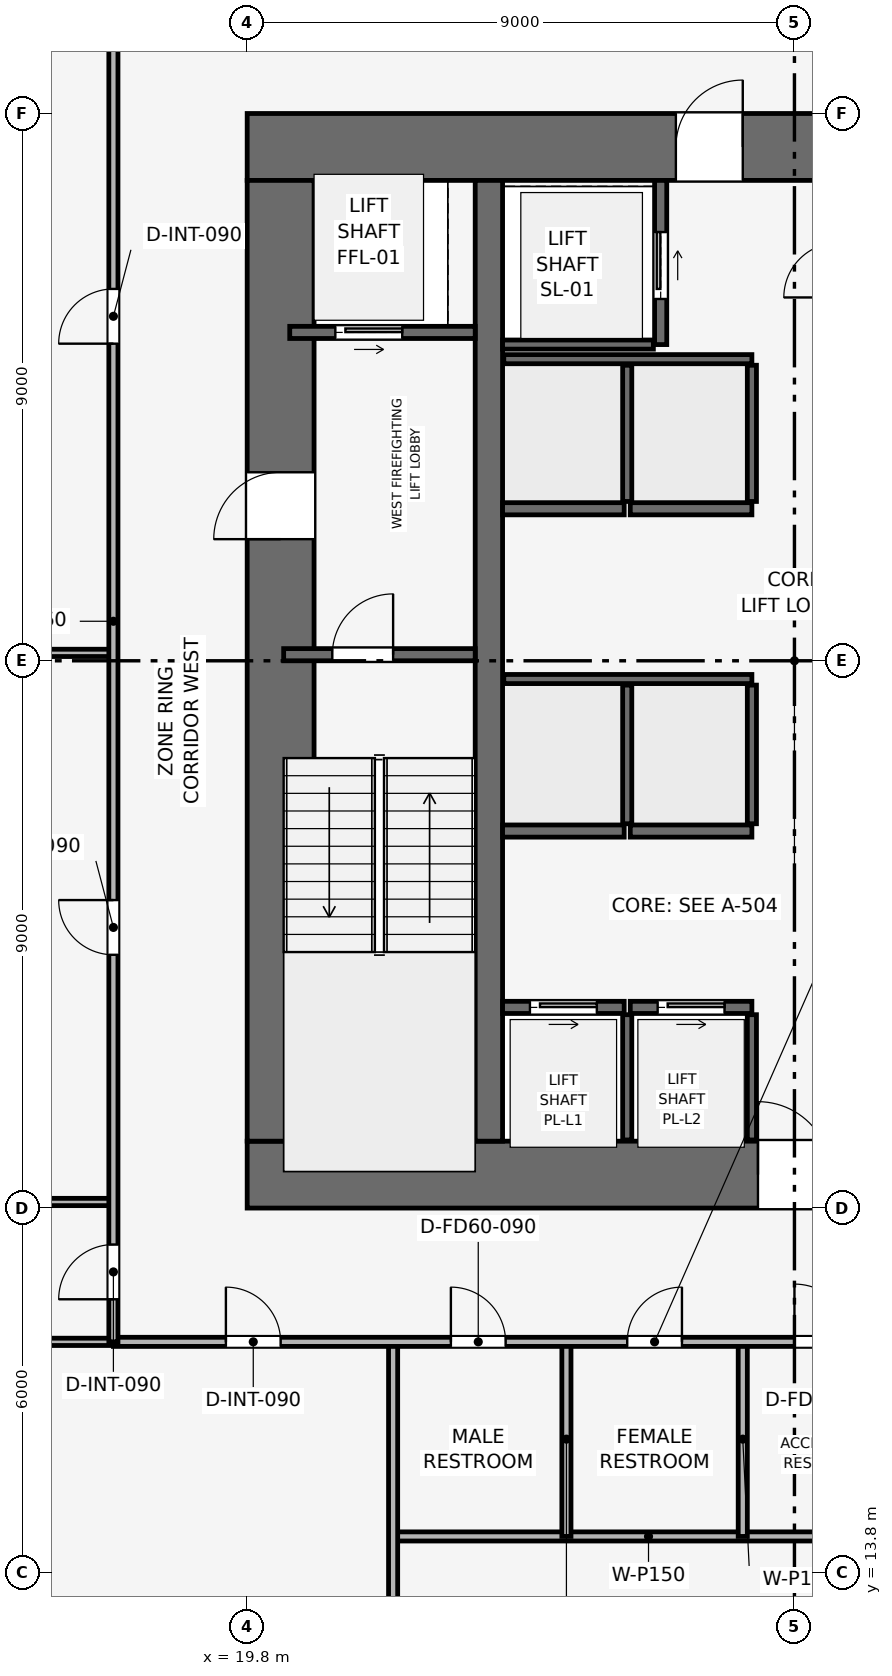
"""IFC4 building model, lengths in metres.
Left out: names, types, materials, properties, quantities, classifications, styles, units other than length and angle.
Written with IfcOpenShell. Run it as: python <this file> out.ifc"""

import sys

from ifc_helpers import new_model, si_unit, direction, frame, frame_2d, origin, place, context, subcontext, project, spatial, rectangle, extrude, element, fill, save


model = new_model("IFC4")
c1 = context("Model", 3, precision=1e-05, world=origin(), true_north=direction((0.0, 1.0)))
c2 = subcontext(c1, "Body", "Model", "MODEL_VIEW")
j1 = project(units=[si_unit("LENGTHUNIT", "METRE"), si_unit("PLANEANGLEUNIT", "RADIAN")], contexts=[c1])
p1 = place(None, origin())
s1 = spatial("IfcSite", under=j1, at=p1, CompositionType="ELEMENT")
p2 = place(p1, origin())
s2 = spatial("IfcBuilding", under=s1, at=p2, CompositionType="ELEMENT")
p3 = place(p2, frame((0.0, 0.0, 37.8)))
s3 = spatial("IfcBuildingStorey", under=s2, at=p3, CompositionType="ELEMENT", Elevation=37.8)
p4 = place(p3, frame((19.8, 20.35, 0.0), z_axis=(0.0, 0.0, 1.0), x_axis=(1.0, 0.0, 0.0)))
e1 = element("IfcWall", 1, at=p4, inside=s3, PredefinedType="SHEAR", context=c2, shape_type="SweptSolid", body=[
    extrude(rectangle(XDim=18.0, YDim=1.1, at=frame_2d((9.0, 0.0))), origin(), (0.0, 0.0, 1.0), 3.9),
])
p5 = place(p4, frame((8.4, 0.0, 0.0)))
e2 = element("IfcOpeningElement", 2, at=p5, cuts=e1, PredefinedType="OPENING", context=c2, shape_type="SweptSolid", body=[
    extrude(rectangle(XDim=1.2, YDim=2.2, at=frame_2d((0.6, 1.1))), frame((0.0, 0.56, 0.0), z_axis=(0.0, -1.0, 0.0), x_axis=(1.0, 0.0, 0.0)), (0.0, 0.0, 1.0), 1.12),
])
p6 = place(p3, frame((19.8, 37.25, 0.0), z_axis=(0.0, 0.0, 1.0), x_axis=(1.0, 0.0, 0.0)))
e3 = element("IfcWall", 3, at=p6, inside=s3, PredefinedType="SHEAR", context=c2, shape_type="SweptSolid", body=[
    extrude(rectangle(XDim=18.0, YDim=1.1, at=frame_2d((9.0, 0.0))), origin(), (0.0, 0.0, 1.0), 3.9),
])
p7 = place(p6, frame((7.05, 0.0, 0.0)))
e4 = element("IfcOpeningElement", 4, at=p7, cuts=e3, PredefinedType="OPENING", context=c2, shape_type="SweptSolid", body=[
    extrude(rectangle(XDim=1.1, YDim=2.15, at=frame_2d((0.55, 1.075))), frame((0.0, 0.56, 0.0), z_axis=(0.0, -1.0, 0.0), x_axis=(1.0, 0.0, 0.0)), (0.0, 0.0, 1.0), 1.12),
])
p8 = place(p3, frame((20.35, 20.9, 0.0), z_axis=(0.0, 0.0, 1.0), x_axis=(0.0, 1.0, 0.0)))
e5 = element("IfcWall", 5, at=p8, inside=s3, PredefinedType="SHEAR", context=c2, shape_type="SweptSolid", body=[
    extrude(rectangle(XDim=15.8, YDim=1.1, at=frame_2d((7.9, 0.0))), origin(), (0.0, 0.0, 1.0), 3.9),
])
p9 = place(p8, frame((9.9, 0.0, 0.0)))
e6 = element("IfcOpeningElement", 6, at=p9, cuts=e5, PredefinedType="OPENING", context=c2, shape_type="SweptSolid", body=[
    extrude(rectangle(XDim=1.1, YDim=2.15, at=frame_2d((0.55, 1.075))), frame((0.0, 0.56, 0.0), z_axis=(0.0, -1.0, 0.0), x_axis=(1.0, 0.0, 0.0)), (0.0, 0.0, 1.0), 1.12),
])
p10 = place(p3, frame((23.775, 20.9, 0.0), z_axis=(0.0, 0.0, 1.0), x_axis=(0.0, 1.0, 0.0)))
e7 = element("IfcWall", 7, at=p10, inside=s3, PredefinedType="SHEAR", context=c2, shape_type="SweptSolid", body=[
    extrude(rectangle(XDim=15.8, YDim=0.45, at=frame_2d((7.9, 0.0))), origin(), (0.0, 0.0, 1.0), 3.9),
])
p11 = place(p3, frame((20.4, 28.9, 0.0), z_axis=(0.0, 0.0, 1.0), x_axis=(1.0, 0.0, 0.0)))
e8 = element("IfcWall", 8, at=p11, inside=s3, PredefinedType="SHEAR", context=c2, shape_type="SweptSolid", body=[
    extrude(rectangle(XDim=3.15, YDim=0.2, at=frame_2d((1.575, 0.0))), origin(), (0.0, 0.0, 1.0), 3.65),
])
p12 = place(p11, frame((0.8, 0.0, 0.0)))
e9 = element("IfcOpeningElement", 9, at=p12, cuts=e8, PredefinedType="OPENING", context=c2, shape_type="SweptSolid", body=[
    extrude(rectangle(XDim=1.0, YDim=2.1, at=frame_2d((0.5, 1.05))), frame((0.0, 0.11, 0.0), z_axis=(0.0, -1.0, 0.0), x_axis=(1.0, 0.0, 0.0)), (0.0, 0.0, 1.0), 0.22),
])
p13 = place(p3, frame((20.5, 34.2, 0.0), z_axis=(0.0, 0.0, 1.0), x_axis=(1.0, 0.0, 0.0)))
e10 = element("IfcWall", 10, at=p13, inside=s3, PredefinedType="SHEAR", context=c2, shape_type="SweptSolid", body=[
    extrude(rectangle(XDim=3.05, YDim=0.2, at=frame_2d((1.525, 0.0))), origin(), (0.0, 0.0, 1.0), 3.65),
])
p14 = place(p13, frame((0.75, 0.0, 0.0)))
e11 = element("IfcOpeningElement", 11, at=p14, cuts=e10, PredefinedType="OPENING", context=c2, shape_type="SweptSolid", body=[
    extrude(rectangle(XDim=1.1, YDim=2.15, at=frame_2d((0.55, 1.075))), frame((0.0, 0.11, 0.0), z_axis=(0.0, -1.0, 0.0), x_axis=(1.0, 0.0, 0.0)), (0.0, 0.0, 1.0), 0.22),
])
p15 = place(p3, frame((26.6, 34.0, 0.0), z_axis=(0.0, 0.0, 1.0), x_axis=(0.0, 1.0, 0.0)))
e12 = element("IfcWall", 12, at=p15, inside=s3, PredefinedType="SHEAR", context=c2, shape_type="SweptSolid", body=[
    extrude(rectangle(XDim=2.7, YDim=0.2, at=frame_2d((1.35, 0.0))), origin(), (0.0, 0.0, 1.0), 3.65),
])
p16 = place(p15, frame((0.75, 0.0, 0.0)))
e13 = element("IfcOpeningElement", 13, at=p16, cuts=e12, PredefinedType="OPENING", context=c2, shape_type="SweptSolid", body=[
    extrude(rectangle(XDim=1.1, YDim=2.15, at=frame_2d((0.55, 1.075))), frame((0.0, 0.11, 0.0), z_axis=(0.0, -1.0, 0.0), x_axis=(1.0, 0.0, 0.0)), (0.0, 0.0, 1.0), 0.22),
])
p17 = place(p3, frame((24.0, 34.0, 0.0), z_axis=(0.0, 0.0, 1.0), x_axis=(1.0, 0.0, 0.0)))
e14 = element("IfcWall", 14, at=p17, inside=s3, PredefinedType="SHEAR", context=c2, shape_type="SweptSolid", body=[
    extrude(rectangle(XDim=2.48, YDim=0.15, at=frame_2d((1.24, 0.0))), origin(), (0.0, 0.0, 1.0), 3.65),
])
p18 = place(p3, frame((24.0, 23.1, 0.0), z_axis=(0.0, 0.0, 1.0), x_axis=(1.0, 0.0, 0.0)))
e15 = element("IfcWall", 15, at=p18, inside=s3, PredefinedType="SHEAR", context=c2, shape_type="SweptSolid", body=[
    extrude(rectangle(XDim=2.0, YDim=0.2, at=frame_2d((1.0, 0.0))), origin(), (0.0, 0.0, 1.0), 3.65),
])
p19 = place(p18, frame((0.45, 0.0, 0.0)))
e16 = element("IfcOpeningElement", 16, at=p19, cuts=e15, PredefinedType="OPENING", context=c2, shape_type="SweptSolid", body=[
    extrude(rectangle(XDim=1.1, YDim=2.15, at=frame_2d((0.55, 1.075))), frame((0.0, 0.11, 0.0), z_axis=(0.0, -1.0, 0.0), x_axis=(1.0, 0.0, 0.0)), (0.0, 0.0, 1.0), 0.22),
])
p20 = place(p3, frame((26.1, 23.1, 0.0), z_axis=(0.0, 0.0, 1.0), x_axis=(1.0, 0.0, 0.0)))
e17 = element("IfcWall", 17, at=p20, inside=s3, PredefinedType="SHEAR", context=c2, shape_type="SweptSolid", body=[
    extrude(rectangle(XDim=2.0, YDim=0.2, at=frame_2d((1.0, 0.0))), origin(), (0.0, 0.0, 1.0), 3.65),
])
p21 = place(p20, frame((0.45, 0.0, 0.0)))
e18 = element("IfcOpeningElement", 18, at=p21, cuts=e17, PredefinedType="OPENING", context=c2, shape_type="SweptSolid", body=[
    extrude(rectangle(XDim=1.1, YDim=2.15, at=frame_2d((0.55, 1.075))), frame((0.0, 0.11, 0.0), z_axis=(0.0, -1.0, 0.0), x_axis=(1.0, 0.0, 0.0)), (0.0, 0.0, 1.0), 0.22),
])
for number, where, z_axis, x_axis in (
    (19, (24.0, 26.0, 0.0), (0.0, 0.0, 1.0), (1.0, 0.0, 0.0)),
    (20, (26.1, 26.0, 0.0), (0.0, 0.0, 1.0), (1.0, 0.0, 0.0)),
    (21, (24.0, 31.3, 0.0), (0.0, 0.0, 1.0), (1.0, 0.0, 0.0)),
    (22, (26.1, 31.3, 0.0), (0.0, 0.0, 1.0), (1.0, 0.0, 0.0)),
):
    element("IfcWall", number, at=place(p3, frame(where, z_axis=z_axis, x_axis=x_axis)), inside=s3, PredefinedType="SHEAR", context=c2, shape_type="SweptSolid", body=[
        extrude(rectangle(XDim=2.0, YDim=0.2, at=frame_2d((1.0, 0.0))), origin(), (0.0, 0.0, 1.0), 3.65),
    ])
for number, where, z_axis, x_axis in (
    (23, (26.05, 20.92, 0.0), (0.0, 0.0, 1.0), (0.0, 1.0, 0.0)),
    (24, (28.1, 20.92, 0.0), (0.0, 0.0, 1.0), (0.0, 1.0, 0.0)),
):
    element("IfcWall", number, at=place(p3, frame(where, z_axis=z_axis, x_axis=x_axis)), inside=s3, PredefinedType="SHEAR", context=c2, shape_type="SweptSolid", body=[
        extrude(rectangle(XDim=2.06, YDim=0.15, at=frame_2d((1.03, 0.0))), origin(), (0.0, 0.0, 1.0), 3.65),
    ])
p22 = place(p3, frame((24.02, 28.5, 0.0), z_axis=(0.0, 0.0, 1.0), x_axis=(1.0, 0.0, 0.0)))
e25 = element("IfcWall", 25, at=p22, inside=s3, PredefinedType="SHEAR", context=c2, shape_type="SweptSolid", body=[
    extrude(rectangle(XDim=4.08, YDim=0.15, at=frame_2d((2.04, 0.0))), origin(), (0.0, 0.0, 1.0), 3.65),
])
for number, where, z_axis, x_axis in (
    (26, (26.05, 26.12, 0.0), (0.0, 0.0, 1.0), (0.0, 1.0, 0.0)),
    (27, (28.1, 26.12, 0.0), (0.0, 0.0, 1.0), (0.0, 1.0, 0.0)),
):
    element("IfcWall", number, at=place(p3, frame(where, z_axis=z_axis, x_axis=x_axis)), inside=s3, PredefinedType="SHEAR", context=c2, shape_type="SweptSolid", body=[
        extrude(rectangle(XDim=2.28, YDim=0.15, at=frame_2d((1.14, 0.0))), origin(), (0.0, 0.0, 1.0), 3.65),
    ])
p23 = place(p3, frame((24.02, 33.76, 0.0), z_axis=(0.0, 0.0, 1.0), x_axis=(1.0, 0.0, 0.0)))
e28 = element("IfcWall", 28, at=p23, inside=s3, PredefinedType="SHEAR", context=c2, shape_type="SweptSolid", body=[
    extrude(rectangle(XDim=4.08, YDim=0.15, at=frame_2d((2.04, 0.0))), origin(), (0.0, 0.0, 1.0), 3.65),
])
for number, where, z_axis, x_axis in (
    (29, (26.05, 31.42, 0.0), (0.0, 0.0, 1.0), (0.0, 1.0, 0.0)),
    (30, (28.1, 31.42, 0.0), (0.0, 0.0, 1.0), (0.0, 1.0, 0.0)),
):
    element("IfcWall", number, at=place(p3, frame(where, z_axis=z_axis, x_axis=x_axis)), inside=s3, PredefinedType="SHEAR", context=c2, shape_type="SweptSolid", body=[
        extrude(rectangle(XDim=2.24, YDim=0.15, at=frame_2d((1.12, 0.0))), origin(), (0.0, 0.0, 1.0), 3.65),
    ])
p24 = place(p3, frame((22.2, 14.4, 0.0), z_axis=(0.0, 0.0, 1.0), x_axis=(1.0, 0.0, 0.0)))
e31 = element("IfcWall", 31, at=p24, inside=s3, PredefinedType="PARTITIONING", context=c2, shape_type="SweptSolid", body=[
    extrude(rectangle(XDim=8.4, YDim=0.15, at=frame_2d((4.2, 0.0))), origin(), (0.0, 0.0, 1.0), 3.085),
])
p25 = place(p3, frame((22.2, 1.03, 0.0), z_axis=(0.0, 0.0, 1.0), x_axis=(0.0, 1.0, 0.0)))
e32 = element("IfcWall", 32, at=p25, inside=s3, PredefinedType="PARTITIONING", context=c2, shape_type="SweptSolid", body=[
    extrude(rectangle(XDim=16.57, YDim=0.15, at=frame_2d((8.285, 0.0))), origin(), (0.0, 0.0, 1.0), 2.935),
])
p26 = place(p25, frame((6.235, 0.0, 0.0)))
e33 = element("IfcOpeningElement", 33, at=p26, cuts=e32, PredefinedType="OPENING", context=c2, shape_type="SweptSolid", body=[
    extrude(rectangle(XDim=0.9, YDim=2.1, at=frame_2d((0.45, 1.05))), frame((0.0, 0.085, 0.0), z_axis=(0.0, -1.0, 0.0), x_axis=(1.0, 0.0, 0.0)), (0.0, 0.0, 1.0), 0.17),
])
for number, where, z_axis, x_axis in (
    (34, (25.05, 14.4, 0.0), (0.0, 0.0, 1.0), (0.0, 1.0, 0.0)),
    (35, (27.95, 14.4, 0.0), (0.0, 0.0, 1.0), (0.0, 1.0, 0.0)),
):
    element("IfcWall", number, at=place(p3, frame(where, z_axis=z_axis, x_axis=x_axis)), inside=s3, PredefinedType="PARTITIONING", context=c2, shape_type="SweptSolid", body=[
        extrude(rectangle(XDim=3.2, YDim=0.15, at=frame_2d((1.6, 0.0))), origin(), (0.0, 0.0, 1.0), 3.65),
    ])
for number, where, z_axis, x_axis in (
    (36, (1.03, 17.6, 0.0), (0.0, 0.0, 1.0), (1.0, 0.0, 0.0)),
    (37, (1.03, 19.9, 0.0), (0.0, 0.0, 1.0), (1.0, 0.0, 0.0)),
):
    element("IfcWall", number, at=place(p3, frame(where, z_axis=z_axis, x_axis=x_axis)), inside=s3, PredefinedType="PARTITIONING", context=c2, shape_type="SweptSolid", body=[
        extrude(rectangle(XDim=16.57, YDim=0.12, at=frame_2d((8.285, 0.0))), origin(), (0.0, 0.0, 1.0), 2.935),
    ])
p27 = place(p3, frame((1.03, 28.93, 0.0), z_axis=(0.0, 0.0, 1.0), x_axis=(1.0, 0.0, 0.0)))
e38 = element("IfcWall", 38, at=p27, inside=s3, PredefinedType="PARTITIONING", context=c2, shape_type="SweptSolid", body=[
    extrude(rectangle(XDim=16.57, YDim=0.12, at=frame_2d((8.285, 0.0))), origin(), (0.0, 0.0, 1.0), 3.085),
])
p28 = place(p3, frame((17.6, 17.6, 0.0), z_axis=(0.0, 0.0, 1.0), x_axis=(1.0, 0.0, 0.0)))
e39 = element("IfcWall", 39, at=p28, inside=s3, PredefinedType="PARTITIONING", context=c2, shape_type="SweptSolid", body=[
    extrude(rectangle(XDim=22.4, YDim=0.15, at=frame_2d((11.2, 0.0))), origin(), (0.0, 0.0, 1.0), 3.085),
])
p29 = place(p28, frame((1.85, 0.0, 0.0)))
e40 = element("IfcOpeningElement", 40, at=p29, cuts=e39, PredefinedType="OPENING", context=c2, shape_type="SweptSolid", body=[
    extrude(rectangle(XDim=0.9, YDim=2.1, at=frame_2d((0.45, 1.05))), frame((0.0, 0.085, 0.0), z_axis=(0.0, -1.0, 0.0), x_axis=(1.0, 0.0, 0.0)), (0.0, 0.0, 1.0), 0.17),
])
p30 = place(p28, frame((5.55, 0.0, 0.0)))
e41 = element("IfcOpeningElement", 41, at=p30, cuts=e39, PredefinedType="OPENING", context=c2, shape_type="SweptSolid", body=[
    extrude(rectangle(XDim=0.9, YDim=2.1, at=frame_2d((0.45, 1.05))), frame((0.0, 0.085, 0.0), z_axis=(0.0, -1.0, 0.0), x_axis=(1.0, 0.0, 0.0)), (0.0, 0.0, 1.0), 0.17),
])
p31 = place(p28, frame((8.45, 0.0, 0.0)))
e42 = element("IfcOpeningElement", 42, at=p31, cuts=e39, PredefinedType="OPENING", context=c2, shape_type="SweptSolid", body=[
    extrude(rectangle(XDim=0.9, YDim=2.1, at=frame_2d((0.45, 1.05))), frame((0.0, 0.085, 0.0), z_axis=(0.0, -1.0, 0.0), x_axis=(1.0, 0.0, 0.0)), (0.0, 0.0, 1.0), 0.17),
])
p32 = place(p28, frame((11.2, 0.0, 0.0)))
e43 = element("IfcOpeningElement", 43, at=p32, cuts=e39, PredefinedType="OPENING", context=c2, shape_type="SweptSolid", body=[
    extrude(rectangle(XDim=0.95, YDim=2.1, at=frame_2d((0.475, 1.05))), frame((0.0, 0.085, 0.0), z_axis=(0.0, -1.0, 0.0), x_axis=(1.0, 0.0, 0.0)), (0.0, 0.0, 1.0), 0.17),
])
p33 = place(p28, frame((17.25, 0.0, 0.0)))
e44 = element("IfcOpeningElement", 44, at=p33, cuts=e39, PredefinedType="OPENING", context=c2, shape_type="SweptSolid", body=[
    extrude(rectangle(XDim=0.9, YDim=2.1, at=frame_2d((0.45, 1.05))), frame((0.0, 0.085, 0.0), z_axis=(0.0, -1.0, 0.0), x_axis=(1.0, 0.0, 0.0)), (0.0, 0.0, 1.0), 0.17),
])
p34 = place(p3, frame((17.6, 17.6, 0.0), z_axis=(0.0, 0.0, 1.0), x_axis=(0.0, 1.0, 0.0)))
e45 = element("IfcWall", 45, at=p34, inside=s3, PredefinedType="PARTITIONING", context=c2, shape_type="SweptSolid", body=[
    extrude(rectangle(XDim=22.4, YDim=0.15, at=frame_2d((11.2, 0.0))), origin(), (0.0, 0.0, 1.0), 3.085),
])
p35 = place(p34, frame((0.7, 0.0, 0.0)))
e46 = element("IfcOpeningElement", 46, at=p35, cuts=e45, PredefinedType="OPENING", context=c2, shape_type="SweptSolid", body=[
    extrude(rectangle(XDim=0.9, YDim=2.1, at=frame_2d((0.45, 1.05))), frame((0.0, 0.085, 0.0), z_axis=(0.0, -1.0, 0.0), x_axis=(1.0, 0.0, 0.0)), (0.0, 0.0, 1.0), 0.17),
])
p36 = place(p34, frame((6.365, 0.0, 0.0)))
e47 = element("IfcOpeningElement", 47, at=p36, cuts=e45, PredefinedType="OPENING", context=c2, shape_type="SweptSolid", body=[
    extrude(rectangle(XDim=0.9, YDim=2.1, at=frame_2d((0.45, 1.05))), frame((0.0, 0.085, 0.0), z_axis=(0.0, -1.0, 0.0), x_axis=(1.0, 0.0, 0.0)), (0.0, 0.0, 1.0), 0.17),
])
p37 = place(p34, frame((16.415, 0.0, 0.0)))
e48 = element("IfcOpeningElement", 48, at=p37, cuts=e45, PredefinedType="OPENING", context=c2, shape_type="SweptSolid", body=[
    extrude(rectangle(XDim=0.9, YDim=2.1, at=frame_2d((0.45, 1.05))), frame((0.0, 0.085, 0.0), z_axis=(0.0, -1.0, 0.0), x_axis=(1.0, 0.0, 0.0)), (0.0, 0.0, 1.0), 0.17),
])
p38 = place(p12, origin())
e49 = element("IfcDoor", 49, at=p38, inside=s3, OperationType="SINGLE_SWING_RIGHT", PredefinedType="DOOR", context=c2, shape_type="SweptSolid", body=[
    extrude(rectangle(XDim=1.0, YDim=2.1, at=frame_2d((0.5, 1.05))), frame((0.0, 0.025, 0.0), z_axis=(0.0, -1.0, 0.0), x_axis=(1.0, 0.0, 0.0)), (0.0, 0.0, 1.0), 0.05),
])
fill(e9, e49)
p39 = place(p14, origin())
e50 = element("IfcDoor", 50, at=p39, inside=s3, OperationType="SLIDING_TO_RIGHT", PredefinedType="DOOR", context=c2, shape_type="SweptSolid", body=[
    extrude(rectangle(XDim=1.1, YDim=2.15, at=frame_2d((0.55, 1.075))), frame((0.0, 0.025, 0.0), z_axis=(0.0, -1.0, 0.0), x_axis=(1.0, 0.0, 0.0)), (0.0, 0.0, 1.0), 0.05),
])
fill(e11, e50)
p40 = place(p16, origin())
e51 = element("IfcDoor", 51, at=p40, inside=s3, OperationType="SLIDING_TO_RIGHT", PredefinedType="DOOR", context=c2, shape_type="SweptSolid", body=[
    extrude(rectangle(XDim=1.1, YDim=2.15, at=frame_2d((0.55, 1.075))), frame((0.0, 0.025, 0.0), z_axis=(0.0, -1.0, 0.0), x_axis=(1.0, 0.0, 0.0)), (0.0, 0.0, 1.0), 0.05),
])
fill(e13, e51)
p41 = place(p19, origin())
e52 = element("IfcDoor", 52, at=p41, inside=s3, OperationType="SLIDING_TO_RIGHT", PredefinedType="DOOR", context=c2, shape_type="SweptSolid", body=[
    extrude(rectangle(XDim=1.1, YDim=2.15, at=frame_2d((0.55, 1.075))), frame((0.0, 0.025, 0.0), z_axis=(0.0, -1.0, 0.0), x_axis=(1.0, 0.0, 0.0)), (0.0, 0.0, 1.0), 0.05),
])
fill(e16, e52)
p42 = place(p21, origin())
e53 = element("IfcDoor", 53, at=p42, inside=s3, OperationType="SLIDING_TO_RIGHT", PredefinedType="DOOR", context=c2, shape_type="SweptSolid", body=[
    extrude(rectangle(XDim=1.1, YDim=2.15, at=frame_2d((0.55, 1.075))), frame((0.0, 0.025, 0.0), z_axis=(0.0, -1.0, 0.0), x_axis=(1.0, 0.0, 0.0)), (0.0, 0.0, 1.0), 0.05),
])
fill(e18, e53)
p43 = place(p29, origin())
e54 = element("IfcDoor", 54, at=p43, inside=s3, OperationType="SINGLE_SWING_LEFT", PredefinedType="DOOR", context=c2, shape_type="SweptSolid", body=[
    extrude(rectangle(XDim=0.9, YDim=2.1, at=frame_2d((0.45, 1.05))), frame((0.0, 0.025, 0.0), z_axis=(0.0, -1.0, 0.0), x_axis=(1.0, 0.0, 0.0)), (0.0, 0.0, 1.0), 0.05),
])
fill(e40, e54)
p44 = place(p30, origin())
e55 = element("IfcDoor", 55, at=p44, inside=s3, OperationType="SINGLE_SWING_LEFT", PredefinedType="DOOR", context=c2, shape_type="SweptSolid", body=[
    extrude(rectangle(XDim=0.9, YDim=2.1, at=frame_2d((0.45, 1.05))), frame((0.0, 0.025, 0.0), z_axis=(0.0, -1.0, 0.0), x_axis=(1.0, 0.0, 0.0)), (0.0, 0.0, 1.0), 0.05),
])
fill(e41, e55)
p45 = place(p31, origin())
e56 = element("IfcDoor", 56, at=p45, inside=s3, OperationType="SINGLE_SWING_RIGHT", PredefinedType="DOOR", context=c2, shape_type="SweptSolid", body=[
    extrude(rectangle(XDim=0.9, YDim=2.1, at=frame_2d((0.45, 1.05))), frame((0.0, 0.025, 0.0), z_axis=(0.0, -1.0, 0.0), x_axis=(1.0, 0.0, 0.0)), (0.0, 0.0, 1.0), 0.05),
])
fill(e42, e56)
p46 = place(p32, origin())
e57 = element("IfcDoor", 57, at=p46, inside=s3, OperationType="SINGLE_SWING_LEFT", PredefinedType="DOOR", context=c2, shape_type="SweptSolid", body=[
    extrude(rectangle(XDim=0.95, YDim=2.1, at=frame_2d((0.475, 1.05))), frame((0.0, 0.025, 0.0), z_axis=(0.0, -1.0, 0.0), x_axis=(1.0, 0.0, 0.0)), (0.0, 0.0, 1.0), 0.05),
])
fill(e43, e57)
p47 = place(p35, origin())
e58 = element("IfcDoor", 58, at=p47, inside=s3, OperationType="SINGLE_SWING_LEFT", PredefinedType="DOOR", context=c2, shape_type="SweptSolid", body=[
    extrude(rectangle(XDim=0.9, YDim=2.1, at=frame_2d((0.45, 1.05))), frame((0.0, 0.025, 0.0), z_axis=(0.0, -1.0, 0.0), x_axis=(1.0, 0.0, 0.0)), (0.0, 0.0, 1.0), 0.05),
])
fill(e46, e58)
p48 = place(p36, origin())
e59 = element("IfcDoor", 59, at=p48, inside=s3, OperationType="SINGLE_SWING_RIGHT", PredefinedType="DOOR", context=c2, shape_type="SweptSolid", body=[
    extrude(rectangle(XDim=0.9, YDim=2.1, at=frame_2d((0.45, 1.05))), frame((0.0, 0.025, 0.0), z_axis=(0.0, -1.0, 0.0), x_axis=(1.0, 0.0, 0.0)), (0.0, 0.0, 1.0), 0.05),
])
fill(e47, e59)
p49 = place(p37, origin())
e60 = element("IfcDoor", 60, at=p49, inside=s3, OperationType="SINGLE_SWING_LEFT", PredefinedType="DOOR", context=c2, shape_type="SweptSolid", body=[
    extrude(rectangle(XDim=0.9, YDim=2.1, at=frame_2d((0.45, 1.05))), frame((0.0, 0.025, 0.0), z_axis=(0.0, -1.0, 0.0), x_axis=(1.0, 0.0, 0.0)), (0.0, 0.0, 1.0), 0.05),
])
fill(e48, e60)
p50 = place(p9, origin())
e61 = element("IfcDoor", 61, at=p50, inside=s3, OperationType="SINGLE_SWING_LEFT", PredefinedType="DOOR", context=c2, shape_type="SweptSolid", body=[
    extrude(rectangle(XDim=1.1, YDim=2.15, at=frame_2d((0.55, 1.075))), frame((0.0, 0.025, 0.0), z_axis=(0.0, -1.0, 0.0), x_axis=(1.0, 0.0, 0.0)), (0.0, 0.0, 1.0), 0.05),
])
fill(e6, e61)
p51 = place(p5, origin())
e62 = element("IfcDoor", 62, at=p51, inside=s3, OperationType="SINGLE_SWING_LEFT", PredefinedType="DOOR", context=c2, shape_type="SweptSolid", body=[
    extrude(rectangle(XDim=1.2, YDim=2.2, at=frame_2d((0.6, 1.1))), frame((0.0, 0.025, 0.0), z_axis=(0.0, -1.0, 0.0), x_axis=(1.0, 0.0, 0.0)), (0.0, 0.0, 1.0), 0.05),
])
fill(e2, e62)
p52 = place(p7, origin())
e63 = element("IfcDoor", 63, at=p52, inside=s3, OperationType="SINGLE_SWING_RIGHT", PredefinedType="DOOR", context=c2, shape_type="SweptSolid", body=[
    extrude(rectangle(XDim=1.1, YDim=2.15, at=frame_2d((0.55, 1.075))), frame((0.0, 0.025, 0.0), z_axis=(0.0, -1.0, 0.0), x_axis=(1.0, 0.0, 0.0)), (0.0, 0.0, 1.0), 0.05),
])
fill(e4, e63)
save(model, sys.argv[1])
